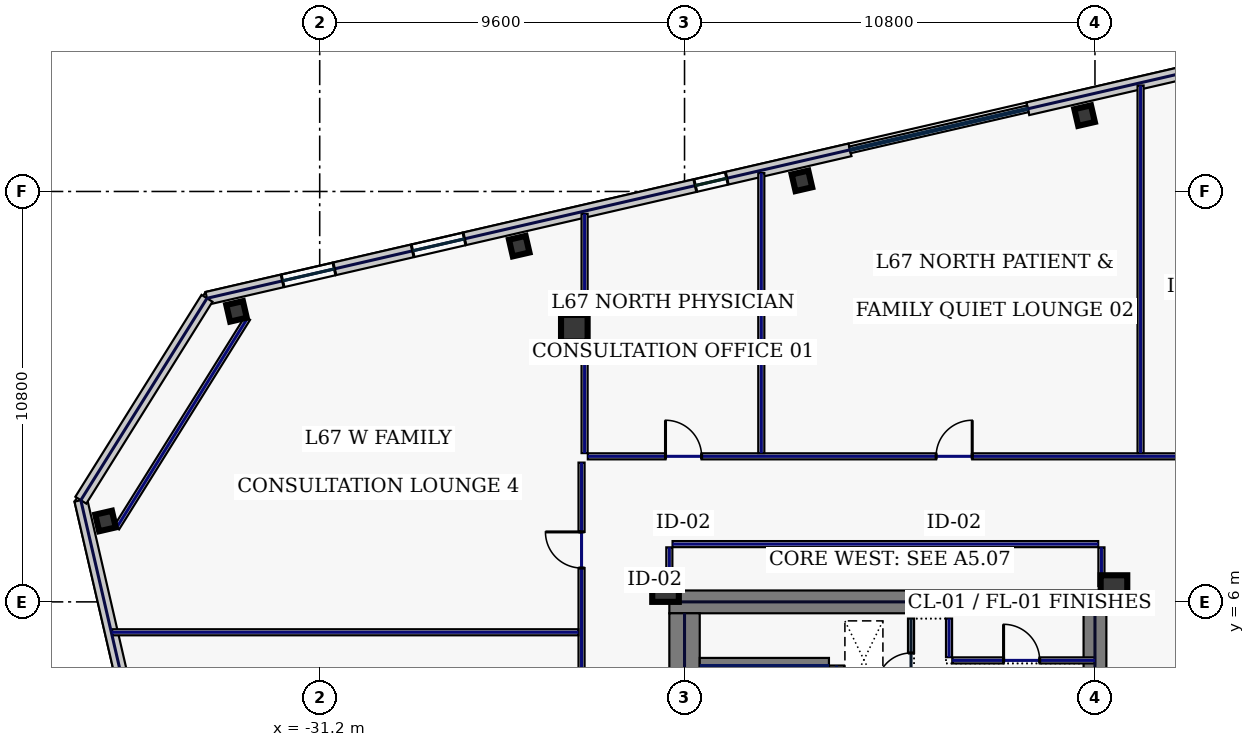
"""IFC4 building model, lengths in metres.
Left out: names, types, materials, properties, quantities, classifications, styles, units other than length and angle.
Written with IfcOpenShell. Run it as: python <this file> out.ifc"""

import sys

from ifc_helpers import new_model, si_unit, direction, frame, frame_2d, origin, origin_2d, place, context, subcontext, project, spatial, rectangle, hollow_rectangle, extrude, element, fill, save


model = new_model("IFC4")
c1 = context("Model", 3, precision=1e-05, world=origin(), true_north=direction((0.0, 1.0)))
c2 = subcontext(c1, "Body", "Model", "MODEL_VIEW")
j1 = project(units=[si_unit("LENGTHUNIT", "METRE"), si_unit("PLANEANGLEUNIT", "RADIAN")], contexts=[c1])
p1 = place(None, origin())
s1 = spatial("IfcSite", under=j1, at=p1, CompositionType="ELEMENT")
p2 = place(p1, origin())
s2 = spatial("IfcBuilding", under=s1, at=p2, CompositionType="ELEMENT")
p3 = place(p2, frame((0.0, 0.0, 289.0)))
s3 = spatial("IfcBuildingStorey", under=s2, at=p3, CompositionType="ELEMENT", Elevation=289.0)
p4 = place(p3, frame((-22.0, 6.0, 0.0), z_axis=(0.0, 0.0, 1.0), x_axis=(1.0, 0.0, 0.0)))
e1 = element("IfcWall", 1, at=p4, inside=s3, PredefinedType="SHEAR", context=c2, shape_type="SweptSolid", body=[
    extrude(rectangle(XDim=11.5, YDim=0.6, at=frame_2d((5.75, 0.0))), origin(), (0.0, 0.0, 1.0), 3.74),
])
p5 = place(p3, frame((-21.6, -5.7, 0.0), z_axis=(0.0, 0.0, 1.0), x_axis=(0.0, 1.0, 0.0)))
e2 = element("IfcWall", 2, at=p5, inside=s3, PredefinedType="SHEAR", context=c2, shape_type="SweptSolid", body=[
    extrude(rectangle(XDim=11.4, YDim=0.8, at=frame_2d((5.7, 0.0))), origin(), (0.0, 0.0, 1.0), 3.74),
])
p6 = place(p3, frame((-10.8, 0.05, 0.0), z_axis=(0.0, 0.0, 1.0), x_axis=(0.0, 1.0, 0.0)))
e3 = element("IfcWall", 3, at=p6, inside=s3, PredefinedType="SHEAR", context=c2, shape_type="SweptSolid", body=[
    extrude(rectangle(XDim=5.65, YDim=0.6, at=frame_2d((2.825, 0.0))), origin(), (0.0, 0.0, 1.0), 3.74),
])
p7 = place(p3, frame((-17.6, -4.325, 0.0), z_axis=(0.0, 0.0, 1.0), x_axis=(0.0, 1.0, 0.0)))
e4 = element("IfcWall", 4, at=p7, inside=s3, PredefinedType="SHEAR", context=c2, shape_type="SweptSolid", body=[
    extrude(rectangle(XDim=8.65, YDim=0.4, at=frame_2d((4.325, 0.0))), origin(), (0.0, 0.0, 1.0), 3.74),
])
p8 = place(p7, frame((0.25, 0.0, 0.0)))
e5 = element("IfcOpeningElement", 5, at=p8, cuts=e4, PredefinedType="OPENING", context=c2, shape_type="SweptSolid", body=[
    extrude(rectangle(XDim=1.1, YDim=2.2, at=frame_2d((0.55, 1.1))), frame((0.0, 0.21, 0.0), z_axis=(0.0, -1.0, 0.0), x_axis=(1.0, 0.0, 0.0)), (0.0, 0.0, 1.0), 0.42),
])
p9 = place(p3, frame((-21.2, 4.325, 0.0), z_axis=(0.0, 0.0, 1.0), x_axis=(1.0, 0.0, 0.0)))
e6 = element("IfcWall", 6, at=p9, inside=s3, PredefinedType="SHEAR", context=c2, shape_type="SweptSolid", body=[
    extrude(rectangle(XDim=3.4, YDim=0.4, at=frame_2d((1.7, 0.0))), origin(), (0.0, 0.0, 1.0), 3.74),
])
for number, where, z_axis, x_axis in (
    (7, (-22.1, 6.35, 0.0), (0.0, 0.0, 1.0), (1.0, 0.0, 0.0)),
    (8, (-10.3, 6.35, 0.0), (0.0, 0.0, 1.0), (1.0, 0.0, 0.0)),
    (9, (-24.5, 13.2, 0.0), (0.0, 0.0, 1.0), (1.0, 0.0, 0.0)),
):
    element("IfcColumn", number, at=place(p3, frame(where, z_axis=z_axis, x_axis=x_axis)), inside=s3, PredefinedType="COLUMN", context=c2, shape_type="SweptSolid", body=[
        extrude(hollow_rectangle(XDim=0.7, YDim=0.7, WallThickness=0.032, at=origin_2d()), origin(), (0.0, 0.0, 1.0), 3.74),
    ])
for number, where, z_axis, x_axis in (
    (10, (-11.073, 18.797, 0.0), (0.0, 0.0, 1.0), (0.974, 0.225, 0.0)),
    (11, (-18.511, 17.08, 0.0), (0.0, 0.0, 1.0), (0.974, 0.225, 0.0)),
    (12, (-25.95, 15.362, 0.0), (0.0, 0.0, 1.0), (0.974, 0.225, 0.0)),
    (13, (-33.389, 13.645, 0.0), (0.0, 0.0, 1.0), (0.974, 0.225, 0.0)),
    (14, (-36.836, 8.128, 0.0), (0.0, 0.0, 1.0), (0.974, 0.225, 0.0)),
):
    element("IfcColumn", number, at=place(p3, frame(where, z_axis=z_axis, x_axis=x_axis)), inside=s3, PredefinedType="COLUMN", context=c2, shape_type="SweptSolid", body=[
        extrude(hollow_rectangle(XDim=0.45, YDim=0.45, WallThickness=0.022, at=origin_2d()), origin(), (0.0, 0.0, 1.0), 3.74),
    ])
p10 = place(p3, frame((-2.368, 21.33, 0.0), z_axis=(0.0, 0.0, 1.0), x_axis=(-0.974367213107, -0.224963405961, 0.0)))
e15 = element("IfcWall", 15, at=p10, inside=s3, PredefinedType="STANDARD", context=c2, shape_type="SweptSolid", body=[
    extrude(rectangle(XDim=10.468, YDim=0.34, at=frame_2d((5.234, 0.0))), origin(), (0.0, 0.0, 1.0), 3.74),
])
p11 = place(p10, frame((2.778, 0.0, 1.0)))
e16 = element("IfcOpeningElement", 16, at=p11, cuts=e15, PredefinedType="OPENING", context=c2, shape_type="SweptSolid", body=[
    extrude(rectangle(XDim=1.4, YDim=1.85, at=frame_2d((0.7, 0.925))), frame((0.0, 0.18, 0.0), z_axis=(0.0, -1.0, 0.0), x_axis=(1.0, 0.0, 0.0)), (0.0, 0.0, 1.0), 0.36),
])
p12 = place(p3, frame((-17.245, 17.895, 0.0), z_axis=(0.0, 0.0, 1.0), x_axis=(-0.97437318493, -0.224937539085, 0.0)))
e17 = element("IfcWall", 17, at=p12, inside=s3, PredefinedType="STANDARD", context=c2, shape_type="SweptSolid", body=[
    extrude(rectangle(XDim=17.366, YDim=0.34, at=frame_2d((8.683, 0.0))), origin(), (0.0, 0.0, 1.0), 3.74),
])
p13 = place(p12, frame((13.925, 0.0, 1.0)))
e18 = element("IfcOpeningElement", 18, at=p13, cuts=e17, PredefinedType="OPENING", context=c2, shape_type="SweptSolid", body=[
    extrude(rectangle(XDim=1.4, YDim=1.85, at=frame_2d((0.7, 0.925))), frame((0.0, 0.18, 0.0), z_axis=(0.0, -1.0, 0.0), x_axis=(1.0, 0.0, 0.0)), (0.0, 0.0, 1.0), 0.36),
])
p14 = place(p12, frame((10.413, 0.0, 1.0)))
e19 = element("IfcOpeningElement", 19, at=p14, cuts=e17, PredefinedType="OPENING", context=c2, shape_type="SweptSolid", body=[
    extrude(rectangle(XDim=1.4, YDim=1.85, at=frame_2d((0.7, 0.925))), frame((0.0, 0.18, 0.0), z_axis=(0.0, -1.0, 0.0), x_axis=(1.0, 0.0, 0.0)), (0.0, 0.0, 1.0), 0.36),
])
p15 = place(p12, frame((3.329, 0.0, 1.0)))
e20 = element("IfcOpeningElement", 20, at=p15, cuts=e17, PredefinedType="OPENING", context=c2, shape_type="SweptSolid", body=[
    extrude(rectangle(XDim=0.85, YDim=1.85, at=frame_2d((0.425, 0.925))), frame((0.0, 0.18, 0.0), z_axis=(0.0, -1.0, 0.0), x_axis=(1.0, 0.0, 0.0)), (0.0, 0.0, 1.0), 0.36),
])
p16 = place(p3, frame((-37.486, 8.676, 0.0), z_axis=(0.0, 0.0, 1.0), x_axis=(0.224953091034, -0.974369594576, 0.0)))
e21 = element("IfcWall", 21, at=p16, inside=s3, PredefinedType="STANDARD", context=c2, shape_type="SweptSolid", body=[
    extrude(rectangle(XDim=36.2, YDim=0.34, at=frame_2d((18.1, 0.0))), origin(), (0.0, 0.0, 1.0), 3.74),
])
p17 = place(p16, frame((4.825, 0.0, 0.75)))
e22 = element("IfcOpeningElement", 22, at=p17, cuts=e21, PredefinedType="OPENING", context=c2, shape_type="SweptSolid", body=[
    extrude(rectangle(XDim=0.85, YDim=1.85, at=frame_2d((0.425, 0.925))), frame((0.0, 0.18, 0.0), z_axis=(0.0, -1.0, 0.0), x_axis=(1.0, 0.0, 0.0)), (0.0, 0.0, 1.0), 0.36),
])
p18 = place(p16, frame((12.425, 0.0, 0.75)))
e23 = element("IfcOpeningElement", 23, at=p18, cuts=e21, PredefinedType="OPENING", context=c2, shape_type="SweptSolid", body=[
    extrude(rectangle(XDim=0.85, YDim=1.85, at=frame_2d((0.425, 0.925))), frame((0.0, 0.18, 0.0), z_axis=(0.0, -1.0, 0.0), x_axis=(1.0, 0.0, 0.0)), (0.0, 0.0, 1.0), 0.36),
])
p19 = place(p16, frame((21.825, 0.0, 0.58)))
e24 = element("IfcOpeningElement", 24, at=p19, cuts=e21, PredefinedType="OPENING", context=c2, shape_type="SweptSolid", body=[
    extrude(rectangle(XDim=1.6, YDim=2.3, at=frame_2d((0.8, 1.15))), frame((0.0, 0.18, 0.0), z_axis=(0.0, -1.0, 0.0), x_axis=(1.0, 0.0, 0.0)), (0.0, 0.0, 1.0), 0.36),
])
p20 = place(p16, frame((30.875, 0.0, 0.58)))
e25 = element("IfcOpeningElement", 25, at=p20, cuts=e21, PredefinedType="OPENING", context=c2, shape_type="SweptSolid", body=[
    extrude(rectangle(XDim=1.6, YDim=2.3, at=frame_2d((0.8, 1.15))), frame((0.0, 0.18, 0.0), z_axis=(0.0, -1.0, 0.0), x_axis=(1.0, 0.0, 0.0)), (0.0, 0.0, 1.0), 0.36),
])
p21 = place(p3, frame((-34.166, 13.989, 0.0), z_axis=(0.0, 0.0, 1.0), x_axis=(-0.529935887993, -0.848037708252, 0.0)))
e26 = element("IfcWall", 26, at=p21, inside=s3, PredefinedType="STANDARD", context=c2, shape_type="SweptSolid", body=[
    extrude(rectangle(XDim=6.265, YDim=0.34, at=frame_2d((3.133, 0.0))), origin(), (0.0, 0.0, 1.0), 3.74),
])
p22 = place(p3, frame((-15.64, 3.405, 0.0), z_axis=(0.0, 0.0, 1.0), x_axis=(0.0, 1.0, 0.0)))
e27 = element("IfcWall", 27, at=p22, inside=s3, PredefinedType="PARTITIONING", context=c2, shape_type="SweptSolid", body=[
    extrude(rectangle(XDim=2.155, YDim=0.16, at=frame_2d((1.078, 0.0))), origin(), (0.0, 0.0, 1.0), 3.74),
])
p23 = place(p22, frame((0.35, 0.0, 0.0)))
e28 = element("IfcOpeningElement", 28, at=p23, cuts=e27, PredefinedType="OPENING", context=c2, shape_type="SweptSolid", body=[
    extrude(rectangle(XDim=0.9, YDim=2.2, at=frame_2d((0.45, 1.1))), frame((0.0, 0.09, 0.0), z_axis=(0.0, -1.0, 0.0), x_axis=(1.0, 0.0, 0.0)), (0.0, 0.0, 1.0), 0.18),
])
p24 = place(p3, frame((-14.555, 4.46, 0.0), z_axis=(0.0, 0.0, 1.0), x_axis=(1.0, 0.0, 0.0)))
e29 = element("IfcWall", 29, at=p24, inside=s3, PredefinedType="PARTITIONING", context=c2, shape_type="SweptSolid", body=[
    extrude(rectangle(XDim=3.755, YDim=0.16, at=frame_2d((1.877, 0.0))), origin(), (0.0, 0.0, 1.0), 3.74),
])
p25 = place(p24, frame((1.35, 0.0, 0.0)))
e30 = element("IfcOpeningElement", 30, at=p25, cuts=e29, PredefinedType="OPENING", context=c2, shape_type="SweptSolid", body=[
    extrude(rectangle(XDim=0.95, YDim=2.2, at=frame_2d((0.475, 1.1))), frame((0.0, 0.09, 0.0), z_axis=(0.0, -1.0, 0.0), x_axis=(1.0, 0.0, 0.0)), (0.0, 0.0, 1.0), 0.18),
])
p26 = place(p3, frame((-14.64, 4.545, 0.0), z_axis=(0.0, 0.0, 1.0), x_axis=(0.0, 1.0, 0.0)))
e31 = element("IfcWall", 31, at=p26, inside=s3, PredefinedType="PARTITIONING", context=c2, shape_type="SweptSolid", body=[
    extrude(rectangle(XDim=1.015, YDim=0.16, at=frame_2d((0.508, 0.0))), origin(), (0.0, 0.0, 1.0), 3.74),
])
p27 = place(p3, frame((-33.1, 13.465, 0.0), z_axis=(0.0, 0.0, 1.0), x_axis=(-0.529958457806, -0.848023604035, 0.0)))
e32 = element("IfcWall", 32, at=p27, inside=s3, PredefinedType="PARTITIONING", context=c2, shape_type="SweptSolid", body=[
    extrude(rectangle(XDim=6.505, YDim=0.16, at=frame_2d((3.252, 0.0))), origin(), (0.0, 0.0, 1.0), 3.74),
])
p28 = place(p3, frame((-24.31, -9.615, 0.0), z_axis=(0.0, 0.0, 1.0), x_axis=(0.0, 1.0, 0.0)))
e33 = element("IfcWall", 33, at=p28, inside=s3, PredefinedType="PARTITIONING", context=c2, shape_type="SweptSolid", body=[
    extrude(rectangle(XDim=19.28, YDim=0.16, at=frame_2d((9.64, 0.0))), origin(), (0.0, 0.0, 1.0), 3.74),
])
p29 = place(p28, frame((1.969, 0.0, 0.0)))
e34 = element("IfcOpeningElement", 34, at=p29, cuts=e33, PredefinedType="OPENING", context=c2, shape_type="SweptSolid", body=[
    extrude(rectangle(XDim=0.95, YDim=2.2, at=frame_2d((0.475, 1.1))), frame((0.0, 0.09, 0.0), z_axis=(0.0, -1.0, 0.0), x_axis=(1.0, 0.0, 0.0)), (0.0, 0.0, 1.0), 0.18),
])
p30 = place(p28, frame((6.625, 0.0, 0.0)))
e35 = element("IfcOpeningElement", 35, at=p30, cuts=e33, PredefinedType="OPENING", context=c2, shape_type="SweptSolid", body=[
    extrude(rectangle(XDim=0.95, YDim=2.2, at=frame_2d((0.475, 1.1))), frame((0.0, 0.09, 0.0), z_axis=(0.0, -1.0, 0.0), x_axis=(1.0, 0.0, 0.0)), (0.0, 0.0, 1.0), 0.18),
])
p31 = place(p28, frame((11.825, 0.0, 0.0)))
e36 = element("IfcOpeningElement", 36, at=p31, cuts=e33, PredefinedType="OPENING", context=c2, shape_type="SweptSolid", body=[
    extrude(rectangle(XDim=0.95, YDim=2.2, at=frame_2d((0.475, 1.1))), frame((0.0, 0.09, 0.0), z_axis=(0.0, -1.0, 0.0), x_axis=(1.0, 0.0, 0.0)), (0.0, 0.0, 1.0), 0.18),
])
p32 = place(p28, frame((16.506, 0.0, 0.0)))
e37 = element("IfcOpeningElement", 37, at=p32, cuts=e33, PredefinedType="OPENING", context=c2, shape_type="SweptSolid", body=[
    extrude(rectangle(XDim=0.95, YDim=2.2, at=frame_2d((0.475, 1.1))), frame((0.0, 0.09, 0.0), z_axis=(0.0, -1.0, 0.0), x_axis=(1.0, 0.0, 0.0)), (0.0, 0.0, 1.0), 0.18),
])
p33 = place(p3, frame((-24.145, 9.83, 0.0), z_axis=(0.0, 0.0, 1.0), x_axis=(1.0, 0.0, 0.0)))
e38 = element("IfcWall", 38, at=p33, inside=s3, PredefinedType="PARTITIONING", context=c2, shape_type="SweptSolid", body=[
    extrude(rectangle(XDim=48.29, YDim=0.16, at=frame_2d((24.145, 0.0))), origin(), (0.0, 0.0, 1.0), 3.74),
])
p34 = place(p33, frame((2.044, 0.0, 0.0)))
e39 = element("IfcOpeningElement", 39, at=p34, cuts=e38, PredefinedType="OPENING", context=c2, shape_type="SweptSolid", body=[
    extrude(rectangle(XDim=0.95, YDim=2.2, at=frame_2d((0.475, 1.1))), frame((0.0, 0.09, 0.0), z_axis=(0.0, -1.0, 0.0), x_axis=(1.0, 0.0, 0.0)), (0.0, 0.0, 1.0), 0.18),
])
p35 = place(p33, frame((9.165, 0.0, 0.0)))
e40 = element("IfcOpeningElement", 40, at=p35, cuts=e38, PredefinedType="OPENING", context=c2, shape_type="SweptSolid", body=[
    extrude(rectangle(XDim=0.95, YDim=2.2, at=frame_2d((0.475, 1.1))), frame((0.0, 0.09, 0.0), z_axis=(0.0, -1.0, 0.0), x_axis=(1.0, 0.0, 0.0)), (0.0, 0.0, 1.0), 0.18),
])
p36 = place(p33, frame((17.705, 0.0, 0.0)))
e41 = element("IfcOpeningElement", 41, at=p36, cuts=e38, PredefinedType="OPENING", context=c2, shape_type="SweptSolid", body=[
    extrude(rectangle(XDim=1.3, YDim=2.2, at=frame_2d((0.65, 1.1))), frame((0.0, 0.09, 0.0), z_axis=(0.0, -1.0, 0.0), x_axis=(1.0, 0.0, 0.0)), (0.0, 0.0, 1.0), 0.18),
])
p37 = place(p33, frame((24.705, 0.0, 0.0)))
e42 = element("IfcOpeningElement", 42, at=p37, cuts=e38, PredefinedType="OPENING", context=c2, shape_type="SweptSolid", body=[
    extrude(rectangle(XDim=1.3, YDim=2.2, at=frame_2d((0.65, 1.1))), frame((0.0, 0.09, 0.0), z_axis=(0.0, -1.0, 0.0), x_axis=(1.0, 0.0, 0.0)), (0.0, 0.0, 1.0), 0.18),
])
p38 = place(p33, frame((31.405, 0.0, 0.0)))
e43 = element("IfcOpeningElement", 43, at=p38, cuts=e38, PredefinedType="OPENING", context=c2, shape_type="SweptSolid", body=[
    extrude(rectangle(XDim=1.3, YDim=2.2, at=frame_2d((0.65, 1.1))), frame((0.0, 0.09, 0.0), z_axis=(0.0, -1.0, 0.0), x_axis=(1.0, 0.0, 0.0)), (0.0, 0.0, 1.0), 0.18),
])
p39 = place(p33, frame((37.98, 0.0, 0.0)))
e44 = element("IfcOpeningElement", 44, at=p39, cuts=e38, PredefinedType="OPENING", context=c2, shape_type="SweptSolid", body=[
    extrude(rectangle(XDim=0.95, YDim=2.2, at=frame_2d((0.475, 1.1))), frame((0.0, 0.09, 0.0), z_axis=(0.0, -1.0, 0.0), x_axis=(1.0, 0.0, 0.0)), (0.0, 0.0, 1.0), 0.18),
])
p40 = place(p33, frame((44.276, 0.0, 0.0)))
e45 = element("IfcOpeningElement", 45, at=p40, cuts=e38, PredefinedType="OPENING", context=c2, shape_type="SweptSolid", body=[
    extrude(rectangle(XDim=1.15, YDim=2.2, at=frame_2d((0.575, 1.1))), frame((0.0, 0.09, 0.0), z_axis=(0.0, -1.0, 0.0), x_axis=(1.0, 0.0, 0.0)), (0.0, 0.0, 1.0), 0.18),
])
p41 = place(p3, frame((-10.63, 6.42, 0.0), z_axis=(0.0, 0.0, 1.0), x_axis=(0.0, 1.0, 0.0)))
e46 = element("IfcWall", 46, at=p41, inside=s3, PredefinedType="PARTITIONING", context=c2, shape_type="SweptSolid", body=[
    extrude(rectangle(XDim=1.015, YDim=0.16, at=frame_2d((0.508, 0.0))), origin(), (0.0, 0.0, 1.0), 3.74),
])
p42 = place(p3, frame((-10.715, 7.52, 0.0), z_axis=(0.0, 0.0, 1.0), x_axis=(-1.0, 0.0, 0.0)))
e47 = element("IfcWall", 47, at=p42, inside=s3, PredefinedType="PARTITIONING", context=c2, shape_type="SweptSolid", body=[
    extrude(rectangle(XDim=11.2, YDim=0.16, at=frame_2d((5.6, 0.0))), origin(), (0.0, 0.0, 1.0), 3.74),
])
p43 = place(p3, frame((-22.0, 7.435, 0.0), z_axis=(0.0, 0.0, 1.0), x_axis=(0.0, -1.0, 0.0)))
e48 = element("IfcWall", 48, at=p43, inside=s3, PredefinedType="PARTITIONING", context=c2, shape_type="SweptSolid", body=[
    extrude(rectangle(XDim=1.015, YDim=0.16, at=frame_2d((0.508, 0.0))), origin(), (0.0, 0.0, 1.0), 3.74),
])
p44 = place(p3, frame((-24.23, 9.915, 0.0), z_axis=(0.0, 0.0, 1.0), x_axis=(0.0, 1.0, 0.0)))
e49 = element("IfcWall", 49, at=p44, inside=s3, PredefinedType="PARTITIONING", context=c2, shape_type="SweptSolid", body=[
    extrude(rectangle(XDim=6.296, YDim=0.16, at=frame_2d((3.148, 0.0))), origin(), (0.0, 0.0, 1.0), 3.74),
])
p45 = place(p3, frame((-19.58, 9.915, 0.0), z_axis=(0.0, 0.0, 1.0), x_axis=(0.0, 1.0, 0.0)))
e50 = element("IfcWall", 50, at=p45, inside=s3, PredefinedType="PARTITIONING", context=c2, shape_type="SweptSolid", body=[
    extrude(rectangle(XDim=7.369, YDim=0.16, at=frame_2d((3.685, 0.0))), origin(), (0.0, 0.0, 1.0), 3.74),
])
p46 = place(p3, frame((-9.6, 9.915, 0.0), z_axis=(0.0, 0.0, 1.0), x_axis=(0.0, 1.0, 0.0)))
e51 = element("IfcWall", 51, at=p46, inside=s3, PredefinedType="PARTITIONING", context=c2, shape_type="SweptSolid", body=[
    extrude(rectangle(XDim=9.673, YDim=0.16, at=frame_2d((4.837, 0.0))), origin(), (0.0, 0.0, 1.0), 3.74),
])
p47 = place(p3, frame((-36.663, 5.2, 0.0), z_axis=(0.0, 0.0, 1.0), x_axis=(1.0, 0.0, 0.0)))
e52 = element("IfcWall", 52, at=p47, inside=s3, PredefinedType="PARTITIONING", context=c2, shape_type="SweptSolid", body=[
    extrude(rectangle(XDim=12.268, YDim=0.16, at=frame_2d((6.134, 0.0))), origin(), (0.0, 0.0, 1.0), 3.74),
])
p48 = place(p13, origin())
e53 = element("IfcWindow", 53, at=p48, inside=s3, PartitioningType="SINGLE_PANEL", PredefinedType="WINDOW", context=c2, shape_type="SweptSolid", body=[
    extrude(rectangle(XDim=1.4, YDim=1.85, at=frame_2d((0.7, 0.925))), frame((0.0, 0.03, 0.0), z_axis=(0.0, -1.0, 0.0), x_axis=(1.0, 0.0, 0.0)), (0.0, 0.0, 1.0), 0.06),
])
fill(e18, e53)
p49 = place(p14, origin())
e54 = element("IfcWindow", 54, at=p49, inside=s3, PartitioningType="SINGLE_PANEL", PredefinedType="WINDOW", context=c2, shape_type="SweptSolid", body=[
    extrude(rectangle(XDim=1.4, YDim=1.85, at=frame_2d((0.7, 0.925))), frame((0.0, 0.03, 0.0), z_axis=(0.0, -1.0, 0.0), x_axis=(1.0, 0.0, 0.0)), (0.0, 0.0, 1.0), 0.06),
])
fill(e19, e54)
p50 = place(p15, origin())
e55 = element("IfcWindow", 55, at=p50, inside=s3, PartitioningType="SINGLE_PANEL", PredefinedType="WINDOW", context=c2, shape_type="SweptSolid", body=[
    extrude(rectangle(XDim=0.85, YDim=1.85, at=frame_2d((0.425, 0.925))), frame((0.0, 0.03, 0.0), z_axis=(0.0, -1.0, 0.0), x_axis=(1.0, 0.0, 0.0)), (0.0, 0.0, 1.0), 0.06),
])
fill(e20, e55)
p51 = place(p23, origin())
e56 = element("IfcDoor", 56, at=p51, inside=s3, OperationType="SINGLE_SWING_LEFT", PredefinedType="DOOR", context=c2, shape_type="SweptSolid", body=[
    extrude(rectangle(XDim=0.9, YDim=2.2, at=frame_2d((0.45, 1.1))), frame((0.0, 0.025, 0.0), z_axis=(0.0, -1.0, 0.0), x_axis=(1.0, 0.0, 0.0)), (0.0, 0.0, 1.0), 0.05),
])
fill(e28, e56)
p52 = place(p25, origin())
e57 = element("IfcDoor", 57, at=p52, inside=s3, OperationType="SINGLE_SWING_LEFT", PredefinedType="DOOR", context=c2, shape_type="SweptSolid", body=[
    extrude(rectangle(XDim=0.95, YDim=2.2, at=frame_2d((0.475, 1.1))), frame((0.0, 0.025, 0.0), z_axis=(0.0, -1.0, 0.0), x_axis=(1.0, 0.0, 0.0)), (0.0, 0.0, 1.0), 0.05),
])
fill(e30, e57)
p53 = place(p34, origin())
e58 = element("IfcDoor", 58, at=p53, inside=s3, OperationType="SINGLE_SWING_LEFT", PredefinedType="DOOR", context=c2, shape_type="SweptSolid", body=[
    extrude(rectangle(XDim=0.95, YDim=2.2, at=frame_2d((0.475, 1.1))), frame((0.0, 0.025, 0.0), z_axis=(0.0, -1.0, 0.0), x_axis=(1.0, 0.0, 0.0)), (0.0, 0.0, 1.0), 0.05),
])
fill(e39, e58)
p54 = place(p35, origin())
e59 = element("IfcDoor", 59, at=p54, inside=s3, OperationType="SINGLE_SWING_RIGHT", PredefinedType="DOOR", context=c2, shape_type="SweptSolid", body=[
    extrude(rectangle(XDim=0.95, YDim=2.2, at=frame_2d((0.475, 1.1))), frame((0.0, 0.025, 0.0), z_axis=(0.0, -1.0, 0.0), x_axis=(1.0, 0.0, 0.0)), (0.0, 0.0, 1.0), 0.05),
])
fill(e40, e59)
p55 = place(p32, origin())
e60 = element("IfcDoor", 60, at=p55, inside=s3, OperationType="SINGLE_SWING_RIGHT", PredefinedType="DOOR", context=c2, shape_type="SweptSolid", body=[
    extrude(rectangle(XDim=0.95, YDim=2.2, at=frame_2d((0.475, 1.1))), frame((0.0, 0.025, 0.0), z_axis=(0.0, -1.0, 0.0), x_axis=(1.0, 0.0, 0.0)), (0.0, 0.0, 1.0), 0.05),
])
fill(e37, e60)
save(model, sys.argv[1])
